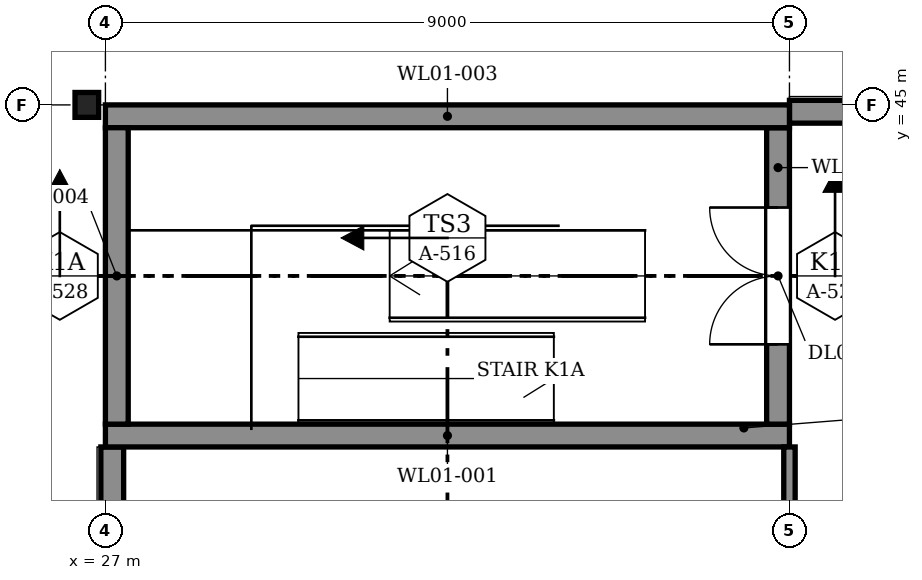
"""IFC4 building model, lengths in metres.
Left out: names, types, materials, properties, quantities, classifications, styles, units other than length and angle.
Written with IfcOpenShell. Run it as: python <this file> out.ifc"""

import sys

from ifc_helpers import new_model, si_unit, direction, frame, frame_2d, origin, origin_2d, place, context, subcontext, project, spatial, rectangle, i_section, extrude, element, fill, save


model = new_model("IFC4")
c1 = context("Model", 3, precision=1e-05, world=origin(), true_north=direction((0.0, 1.0)))
c2 = subcontext(c1, "Body", "Model", "MODEL_VIEW")
j1 = project(units=[si_unit("LENGTHUNIT", "METRE"), si_unit("PLANEANGLEUNIT", "RADIAN")], contexts=[c1])
p1 = place(None, origin())
s1 = spatial("IfcSite", under=j1, at=p1, CompositionType="ELEMENT")
p2 = place(p1, origin())
s2 = spatial("IfcBuilding", under=s1, at=p2, CompositionType="ELEMENT")
p3 = place(p2, frame((0.0, 0.0, 5.0)))
s3 = spatial("IfcBuildingStorey", under=s2, at=p3, CompositionType="ELEMENT", Elevation=5.0)
p4 = place(p3, frame((26.756, 45.0, 0.0), z_axis=(0.0, 0.0, 1.0), x_axis=(1.0, 0.0, 0.0)))
e1 = element("IfcColumn", 1, at=p4, inside=s3, PredefinedType="COLUMN", context=c2, shape_type="SweptSolid", body=[
    extrude(i_section(OverallWidth=0.311, OverallDepth=0.327, WebThickness=0.016, FlangeThickness=0.025, FilletRadius=0.017, at=origin_2d()), origin(), (0.0, 0.0, 1.0), 3.757),
])
p5 = place(p3, frame((36.0, 44.91, 0.0), z_axis=(0.0, 0.0, 1.0), x_axis=(1.0, 0.0, 0.0)))
e2 = element("IfcWall", 2, at=p5, inside=s3, PredefinedType="SOLIDWALL", context=c2, shape_type="SweptSolid", body=[
    extrude(rectangle(XDim=8.85, YDim=0.3, at=frame_2d((4.425, 0.0))), origin(), (0.0, 0.0, 1.0), 3.578),
])
p6 = place(p3, frame((27.09, 36.15, 0.0), z_axis=(0.0, 0.0, 1.0), x_axis=(0.0, 1.0, 0.0)))
e3 = element("IfcWall", 3, at=p6, inside=s3, PredefinedType="SOLIDWALL", context=c2, shape_type="SweptSolid", body=[
    extrude(rectangle(XDim=4.35, YDim=0.3, at=frame_2d((2.175, 0.0))), origin(), (0.0, 0.0, 1.0), 3.578),
])
p7 = place(p3, frame((27.0, 40.65, 0.0), z_axis=(0.0, 0.0, 1.0), x_axis=(1.0, 0.0, 0.0)))
e4 = element("IfcWall", 4, at=p7, inside=s3, PredefinedType="SOLIDWALL", context=c2, shape_type="SweptSolid", body=[
    extrude(rectangle(XDim=9.0, YDim=0.3, at=frame_2d((4.5, 0.0))), origin(), (0.0, 0.0, 1.0), 4.2),
])
p8 = place(p3, frame((35.85, 40.8, 0.0), z_axis=(0.0, 0.0, 1.0), x_axis=(0.0, 1.0, 0.0)))
e5 = element("IfcWall", 5, at=p8, inside=s3, PredefinedType="SOLIDWALL", context=c2, shape_type="SweptSolid", body=[
    extrude(rectangle(XDim=3.9, YDim=0.3, at=frame_2d((1.95, 0.0))), origin(), (0.0, 0.0, 1.0), 4.2),
])
p9 = place(p8, frame((1.05, 0.0, 0.0)))
e6 = element("IfcOpeningElement", 6, at=p9, cuts=e5, PredefinedType="OPENING", context=c2, shape_type="SweptSolid", body=[
    extrude(rectangle(XDim=1.8, YDim=2.1, at=frame_2d((0.9, 1.05))), frame((0.0, 0.16, 0.0), z_axis=(0.0, -1.0, 0.0), x_axis=(1.0, 0.0, 0.0)), (0.0, 0.0, 1.0), 0.32),
])
p10 = place(p3, frame((27.0, 44.85, 0.0), z_axis=(0.0, 0.0, 1.0), x_axis=(1.0, 0.0, 0.0)))
e7 = element("IfcWall", 7, at=p10, inside=s3, PredefinedType="SOLIDWALL", context=c2, shape_type="SweptSolid", body=[
    extrude(rectangle(XDim=9.0, YDim=0.3, at=frame_2d((4.5, 0.0))), origin(), (0.0, 0.0, 1.0), 4.2),
])
p11 = place(p3, frame((27.15, 40.8, 0.0), z_axis=(0.0, 0.0, 1.0), x_axis=(0.0, 1.0, 0.0)))
e8 = element("IfcWall", 8, at=p11, inside=s3, PredefinedType="SOLIDWALL", context=c2, shape_type="SweptSolid", body=[
    extrude(rectangle(XDim=3.9, YDim=0.3, at=frame_2d((1.95, 0.0))), origin(), (0.0, 0.0, 1.0), 4.2),
])
p12 = place(p3, frame((36.0, 36.24, 0.0), z_axis=(0.0, 0.0, 1.0), x_axis=(0.0, 1.0, 0.0)))
e9 = element("IfcWall", 9, at=p12, inside=s3, PredefinedType="PARTITIONING", context=c2, shape_type="SweptSolid", body=[
    extrude(rectangle(XDim=4.26, YDim=0.15, at=frame_2d((2.13, 0.0))), origin(), (0.0, 0.0, 1.0), 3.502),
])
p13 = place(p12, frame((0.95, 0.0, 0.0)))
e10 = element("IfcOpeningElement", 10, at=p13, cuts=e9, PredefinedType="OPENING", context=c2, shape_type="SweptSolid", body=[
    extrude(rectangle(XDim=2.4, YDim=2.4, at=frame_2d((1.2, 1.2))), frame((0.0, 0.085, 0.0), z_axis=(0.0, -1.0, 0.0), x_axis=(1.0, 0.0, 0.0)), (0.0, 0.0, 1.0), 0.17),
])
p14 = place(p9, origin())
e11 = element("IfcDoor", 11, at=p14, inside=s3, OperationType="DOUBLE_DOOR_SINGLE_SWING", PredefinedType="DOOR", context=c2, shape_type="SweptSolid", body=[
    extrude(rectangle(XDim=1.8, YDim=2.1, at=frame_2d((0.9, 1.05))), frame((0.0, 0.025, 0.0), z_axis=(0.0, -1.0, 0.0), x_axis=(1.0, 0.0, 0.0)), (0.0, 0.0, 1.0), 0.05),
])
fill(e6, e11)
save(model, sys.argv[1])
